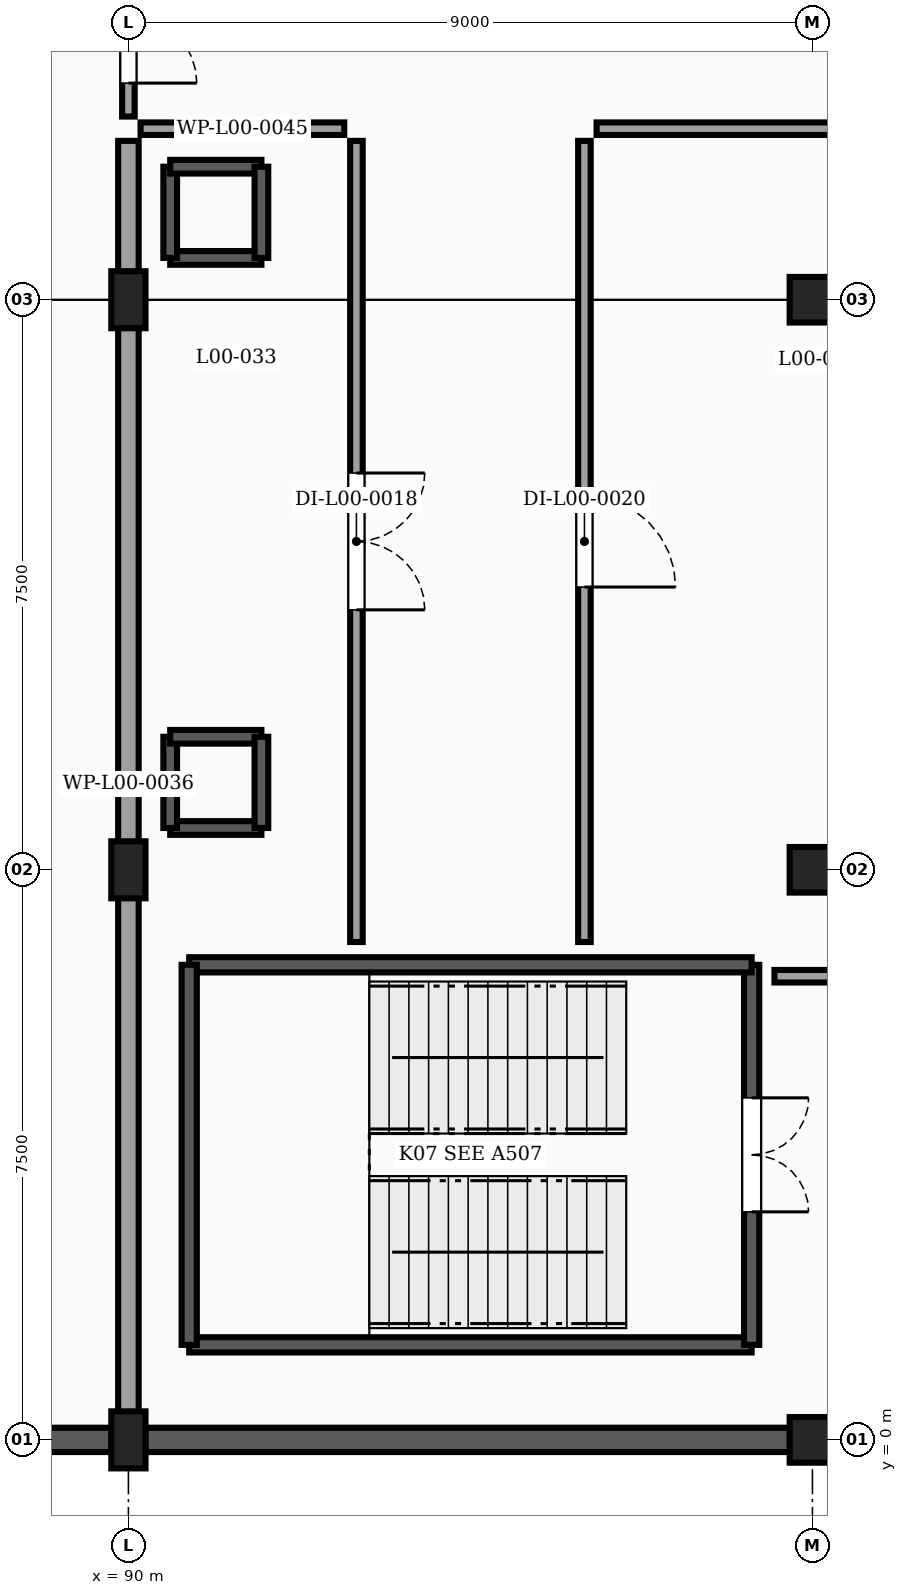
"""IFC4 building model, lengths in metres.
Left out: names, types, materials, properties, quantities, classifications, styles, units other than length and angle.
Written with IfcOpenShell. Run it as: python <this file> out.ifc"""

import sys

from ifc_helpers import new_model, si_unit, direction, frame, frame_2d, origin, origin_2d, place, context, subcontext, project, spatial, rectangle, extrude, element, fill, save


model = new_model("IFC4")
c1 = context("Model", 3, precision=1e-05, world=origin(), true_north=direction((0.0, 1.0)))
c2 = subcontext(c1, "Body", "Model", "MODEL_VIEW")
j1 = project(units=[si_unit("LENGTHUNIT", "METRE"), si_unit("PLANEANGLEUNIT", "RADIAN")], contexts=[c1])
p1 = place(None, origin())
s1 = spatial("IfcSite", under=j1, at=p1, CompositionType="ELEMENT")
p2 = place(p1, origin())
s2 = spatial("IfcBuilding", under=s1, at=p2, CompositionType="ELEMENT")
p3 = place(p2, origin())
s3 = spatial("IfcBuildingStorey", under=s2, at=p3, CompositionType="ELEMENT", Elevation=0.0)
p4 = place(p3, frame((90.0, 0.0, -0.25), z_axis=(0.0, 0.0, 1.0), x_axis=(1.0, 0.0, 0.0)))
e1 = element("IfcColumn", 1, at=p4, inside=s3, PredefinedType="COLUMN", context=c2, shape_type="SweptSolid", body=[
    extrude(rectangle(XDim=0.45, YDim=0.75, at=origin_2d()), origin(), (0.0, 0.0, 1.0), 4.75),
])
p5 = place(p3, frame((99.0, 0.0, -0.25), z_axis=(0.0, 0.0, 1.0), x_axis=(1.0, 0.0, 0.0)))
e2 = element("IfcColumn", 2, at=p5, inside=s3, PredefinedType="COLUMN", context=c2, shape_type="SweptSolid", body=[
    extrude(rectangle(XDim=0.6, YDim=0.6, at=origin_2d()), origin(), (0.0, 0.0, 1.0), 4.75),
])
p6 = place(p3, frame((90.0, 7.5, -0.25), z_axis=(0.0, 0.0, 1.0), x_axis=(1.0, 0.0, 0.0)))
e3 = element("IfcColumn", 3, at=p6, inside=s3, PredefinedType="COLUMN", context=c2, shape_type="SweptSolid", body=[
    extrude(rectangle(XDim=0.45, YDim=0.75, at=origin_2d()), origin(), (0.0, 0.0, 1.0), 4.75),
])
p7 = place(p3, frame((99.0, 7.5, -0.25), z_axis=(0.0, 0.0, 1.0), x_axis=(1.0, 0.0, 0.0)))
e4 = element("IfcColumn", 4, at=p7, inside=s3, PredefinedType="COLUMN", context=c2, shape_type="SweptSolid", body=[
    extrude(rectangle(XDim=0.6, YDim=0.6, at=origin_2d()), origin(), (0.0, 0.0, 1.0), 4.75),
])
p8 = place(p3, frame((90.0, 15.0, -0.25), z_axis=(0.0, 0.0, 1.0), x_axis=(1.0, 0.0, 0.0)))
e5 = element("IfcColumn", 5, at=p8, inside=s3, PredefinedType="COLUMN", context=c2, shape_type="SweptSolid", body=[
    extrude(rectangle(XDim=0.45, YDim=0.75, at=origin_2d()), origin(), (0.0, 0.0, 1.0), 4.75),
])
p9 = place(p3, frame((99.0, 15.0, -0.25), z_axis=(0.0, 0.0, 1.0), x_axis=(1.0, 0.0, 0.0)))
e6 = element("IfcColumn", 6, at=p9, inside=s3, PredefinedType="COLUMN", context=c2, shape_type="SweptSolid", body=[
    extrude(rectangle(XDim=0.6, YDim=0.6, at=origin_2d()), origin(), (0.0, 0.0, 1.0), 4.75),
])
p10 = place(p3, frame((98.704, 0.0, 0.0), z_axis=(0.0, 0.0, 1.0), x_axis=(-1.0, 0.0, 0.0)))
e7 = element("IfcWall", 7, at=p10, inside=s3, PredefinedType="SOLIDWALL", context=c2, shape_type="SweptSolid", body=[
    extrude(rectangle(XDim=8.483, YDim=0.32, at=frame_2d((4.242, 0.0))), origin(), (0.0, 0.0, 1.0), 3.442),
])
p11 = place(p3, frame((89.779, 0.0, 0.0), z_axis=(0.0, 0.0, 1.0), x_axis=(-1.0, 0.0, 0.0)))
e8 = element("IfcWall", 8, at=p11, inside=s3, PredefinedType="SOLIDWALL", context=c2, shape_type="SweptSolid", body=[
    extrude(rectangle(XDim=8.483, YDim=0.32, at=frame_2d((4.242, 0.0))), origin(), (0.0, 0.0, 1.0), 4.1),
])
for number, where, z_axis, x_axis in (
    (9, (91.75, 8.05, 0.0), (0.0, 0.0, 1.0), (-1.0, 0.0, 0.0)),
    (10, (90.55, 8.05, 0.0), (0.0, 0.0, 1.0), (0.0, 1.0, 0.0)),
    (11, (90.55, 9.25, 0.0), (0.0, 0.0, 1.0), (1.0, 0.0, 0.0)),
    (12, (91.75, 9.25, 0.0), (0.0, 0.0, 1.0), (0.0, -1.0, 0.0)),
    (13, (91.75, 15.55, 0.0), (0.0, 0.0, 1.0), (-1.0, 0.0, 0.0)),
    (14, (90.55, 15.55, 0.0), (0.0, 0.0, 1.0), (0.0, 1.0, 0.0)),
    (15, (90.55, 16.75, 0.0), (0.0, 0.0, 1.0), (1.0, 0.0, 0.0)),
    (16, (91.75, 16.75, 0.0), (0.0, 0.0, 1.0), (0.0, -1.0, 0.0)),
):
    element("IfcWall", number, at=place(p3, frame(where, z_axis=z_axis, x_axis=x_axis)), inside=s3, PredefinedType="SHEAR", context=c2, shape_type="SweptSolid", body=[
        extrude(rectangle(XDim=1.2, YDim=0.18, at=frame_2d((0.6, 0.0))), origin(), (0.0, 0.0, 1.0), 4.1),
    ])
p12 = place(p3, frame((90.8, 1.25, 0.0), z_axis=(0.0, 0.0, 1.0), x_axis=(1.0, 0.0, 0.0)))
e17 = element("IfcWall", 17, at=p12, inside=s3, PredefinedType="SHEAR", context=c2, shape_type="SweptSolid", body=[
    extrude(rectangle(XDim=7.4, YDim=0.2, at=frame_2d((3.7, 0.0))), origin(), (0.0, 0.0, 1.0), 4.1),
])
p13 = place(p3, frame((98.2, 6.25, 0.0), z_axis=(0.0, 0.0, 1.0), x_axis=(0.0, -1.0, 0.0)))
e18 = element("IfcWall", 18, at=p13, inside=s3, PredefinedType="SHEAR", context=c2, shape_type="SweptSolid", body=[
    extrude(rectangle(XDim=5.0, YDim=0.2, at=frame_2d((2.5, 0.0))), origin(), (0.0, 0.0, 1.0), 4.1),
])
p14 = place(p13, frame((1.75, 0.0, 0.0)))
e19 = element("IfcOpeningElement", 19, at=p14, cuts=e18, PredefinedType="OPENING", context=c2, shape_type="SweptSolid", body=[
    extrude(rectangle(XDim=1.5, YDim=2.15, at=frame_2d((0.75, 1.075))), frame((0.0, 0.11, 0.0), z_axis=(0.0, -1.0, 0.0), x_axis=(1.0, 0.0, 0.0)), (0.0, 0.0, 1.0), 0.22),
])
p15 = place(p3, frame((98.2, 6.25, 0.0), z_axis=(0.0, 0.0, 1.0), x_axis=(-1.0, 0.0, 0.0)))
e20 = element("IfcWall", 20, at=p15, inside=s3, PredefinedType="SHEAR", context=c2, shape_type="SweptSolid", body=[
    extrude(rectangle(XDim=7.4, YDim=0.2, at=frame_2d((3.7, 0.0))), origin(), (0.0, 0.0, 1.0), 4.1),
])
p16 = place(p3, frame((90.8, 6.25, 0.0), z_axis=(0.0, 0.0, 1.0), x_axis=(0.0, -1.0, 0.0)))
e21 = element("IfcWall", 21, at=p16, inside=s3, PredefinedType="SHEAR", context=c2, shape_type="SweptSolid", body=[
    extrude(rectangle(XDim=5.0, YDim=0.2, at=frame_2d((2.5, 0.0))), origin(), (0.0, 0.0, 1.0), 4.1),
])
p17 = place(p3, frame((90.0, 20.09, 0.0), z_axis=(0.0, 0.0, 1.0), x_axis=(0.0, -1.0, 0.0)))
e22 = element("IfcWall", 22, at=p17, inside=s3, PredefinedType="PARTITIONING", context=c2, shape_type="SweptSolid", body=[
    extrude(rectangle(XDim=2.68, YDim=0.165, at=frame_2d((1.34, 0.0))), origin(), (0.0, 0.0, 1.0), 3.442),
])
p18 = place(p17, frame((0.44, 0.0, 0.0)))
e23 = element("IfcOpeningElement", 23, at=p18, cuts=e22, PredefinedType="OPENING", context=c2, shape_type="SweptSolid", body=[
    extrude(rectangle(XDim=1.8, YDim=2.25, at=frame_2d((0.9, 1.125))), frame((0.0, 0.093, 0.0), z_axis=(0.0, -1.0, 0.0), x_axis=(1.0, 0.0, 0.0)), (0.0, 0.0, 1.0), 0.185),
])
p19 = place(p3, frame((90.0, 17.09, 0.0), z_axis=(0.0, 0.0, 1.0), x_axis=(0.0, -1.0, 0.0)))
e24 = element("IfcWall", 24, at=p19, inside=s3, PredefinedType="PARTITIONING", context=c2, shape_type="SweptSolid", body=[
    extrude(rectangle(XDim=16.93, YDim=0.27, at=frame_2d((8.465, 0.0))), origin(), (0.0, 0.0, 1.0), 3.442),
])
p20 = place(p3, frame((93.0, 17.09, 0.0), z_axis=(0.0, 0.0, 1.0), x_axis=(0.0, -1.0, 0.0)))
e25 = element("IfcWall", 25, at=p20, inside=s3, PredefinedType="PARTITIONING", context=c2, shape_type="SweptSolid", body=[
    extrude(rectangle(XDim=10.54, YDim=0.165, at=frame_2d((5.27, 0.0))), origin(), (0.0, 0.0, 1.0), 3.788),
])
p21 = place(p20, frame((4.37, 0.0, 0.0)))
e26 = element("IfcOpeningElement", 26, at=p21, cuts=e25, PredefinedType="OPENING", context=c2, shape_type="SweptSolid", body=[
    extrude(rectangle(XDim=1.8, YDim=2.25, at=frame_2d((0.9, 1.125))), frame((0.0, 0.093, 0.0), z_axis=(0.0, -1.0, 0.0), x_axis=(1.0, 0.0, 0.0)), (0.0, 0.0, 1.0), 0.185),
])
p22 = place(p3, frame((90.16, 17.25, 0.0), z_axis=(0.0, 0.0, 1.0), x_axis=(1.0, 0.0, 0.0)))
e27 = element("IfcWall", 27, at=p22, inside=s3, PredefinedType="PARTITIONING", context=c2, shape_type="SweptSolid", body=[
    extrude(rectangle(XDim=2.68, YDim=0.165, at=frame_2d((1.34, 0.0))), origin(), (0.0, 0.0, 1.0), 4.1),
])
p23 = place(p3, frame((101.84, 17.25, 0.0), z_axis=(0.0, 0.0, 1.0), x_axis=(-1.0, 0.0, 0.0)))
e28 = element("IfcWall", 28, at=p23, inside=s3, PredefinedType="PARTITIONING", context=c2, shape_type="SweptSolid", body=[
    extrude(rectangle(XDim=5.68, YDim=0.165, at=frame_2d((2.84, 0.0))), origin(), (0.0, 0.0, 1.0), 4.1),
])
p24 = place(p3, frame((96.0, 17.09, 0.0), z_axis=(0.0, 0.0, 1.0), x_axis=(0.0, -1.0, 0.0)))
e29 = element("IfcWall", 29, at=p24, inside=s3, PredefinedType="PARTITIONING", context=c2, shape_type="SweptSolid", body=[
    extrude(rectangle(XDim=10.54, YDim=0.165, at=frame_2d((5.27, 0.0))), origin(), (0.0, 0.0, 1.0), 3.788),
])
p25 = place(p24, frame((4.67, 0.0, 0.0)))
e30 = element("IfcOpeningElement", 30, at=p25, cuts=e29, PredefinedType="OPENING", context=c2, shape_type="SweptSolid", body=[
    extrude(rectangle(XDim=1.2, YDim=2.15, at=frame_2d((0.6, 1.075))), frame((0.0, 0.093, 0.0), z_axis=(0.0, -1.0, 0.0), x_axis=(1.0, 0.0, 0.0)), (0.0, 0.0, 1.0), 0.185),
])
p26 = place(p3, frame((98.5, 6.1, 0.0), z_axis=(0.0, 0.0, 1.0), x_axis=(1.0, 0.0, 0.0)))
e31 = element("IfcWall", 31, at=p26, inside=s3, PredefinedType="PARTITIONING", context=c2, shape_type="SweptSolid", body=[
    extrude(rectangle(XDim=1.49, YDim=0.165, at=frame_2d((0.745, 0.0))), origin(), (0.0, 0.0, 1.0), 4.1),
])
p27 = place(p14, origin())
e32 = element("IfcDoor", 32, at=p27, inside=s3, OperationType="DOUBLE_DOOR_SINGLE_SWING", PredefinedType="DOOR", context=c2, shape_type="SweptSolid", body=[
    extrude(rectangle(XDim=1.5, YDim=2.15, at=frame_2d((0.75, 1.075))), frame((0.0, 0.025, 0.0), z_axis=(0.0, -1.0, 0.0), x_axis=(1.0, 0.0, 0.0)), (0.0, 0.0, 1.0), 0.05),
])
fill(e19, e32)
p28 = place(p18, origin())
e33 = element("IfcDoor", 33, at=p28, inside=s3, OperationType="DOUBLE_DOOR_SINGLE_SWING", PredefinedType="DOOR", context=c2, shape_type="SweptSolid", body=[
    extrude(rectangle(XDim=1.8, YDim=2.25, at=frame_2d((0.9, 1.125))), frame((0.0, 0.025, 0.0), z_axis=(0.0, -1.0, 0.0), x_axis=(1.0, 0.0, 0.0)), (0.0, 0.0, 1.0), 0.05),
])
fill(e23, e33)
p29 = place(p21, origin())
e34 = element("IfcDoor", 34, at=p29, inside=s3, OperationType="DOUBLE_DOOR_SINGLE_SWING", PredefinedType="DOOR", context=c2, shape_type="SweptSolid", body=[
    extrude(rectangle(XDim=1.8, YDim=2.25, at=frame_2d((0.9, 1.125))), frame((0.0, 0.025, 0.0), z_axis=(0.0, -1.0, 0.0), x_axis=(1.0, 0.0, 0.0)), (0.0, 0.0, 1.0), 0.05),
])
fill(e26, e34)
p30 = place(p25, origin())
e35 = element("IfcDoor", 35, at=p30, inside=s3, OperationType="SINGLE_SWING_RIGHT", PredefinedType="DOOR", context=c2, shape_type="SweptSolid", body=[
    extrude(rectangle(XDim=1.2, YDim=2.15, at=frame_2d((0.6, 1.075))), frame((0.0, 0.025, 0.0), z_axis=(0.0, -1.0, 0.0), x_axis=(1.0, 0.0, 0.0)), (0.0, 0.0, 1.0), 0.05),
])
fill(e30, e35)
save(model, sys.argv[1])
